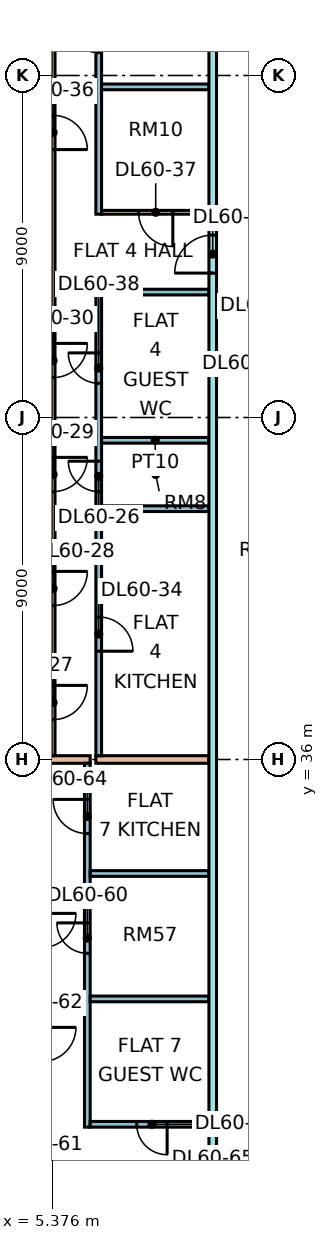
"""IFC4 building model, lengths in metres.
Left out: names, types, materials, properties, quantities, classifications, styles, units other than length and angle.
Written with IfcOpenShell. Run it as: python <this file> out.ifc"""

import sys

from ifc_helpers import new_model, si_unit, direction, frame, frame_2d, origin, place, context, subcontext, project, spatial, rectangle, extrude, element, fill, save


model = new_model("IFC4")
c1 = context("Model", 3, precision=1e-05, world=origin(), true_north=direction((0.0, 1.0)))
c2 = subcontext(c1, "Body", "Model", "MODEL_VIEW")
j1 = project(units=[si_unit("LENGTHUNIT", "METRE"), si_unit("PLANEANGLEUNIT", "RADIAN")], contexts=[c1])
p1 = place(None, origin())
s1 = spatial("IfcSite", under=j1, at=p1, CompositionType="ELEMENT")
p2 = place(p1, origin())
s2 = spatial("IfcBuilding", under=s1, at=p2, CompositionType="ELEMENT")
p3 = place(p2, frame((0.0, 0.0, 252.9)))
s3 = spatial("IfcBuildingStorey", under=s2, at=p3, CompositionType="ELEMENT", Elevation=252.9)
p4 = place(p3, frame((0.0, 36.0, 0.0), z_axis=(0.0, 0.0, 1.0), x_axis=(1.0, 0.0, 0.0)))
e1 = element("IfcWall", 1, at=p4, inside=s3, PredefinedType="PARTITIONING", context=c2, shape_type="SweptSolid", body=[
    extrude(rectangle(XDim=6.375, YDim=0.2, at=frame_2d((3.188, 0.0))), origin(), (0.0, 0.0, 1.0), 3.3),
])
p5 = place(p3, frame((5.4, 36.1, 0.0), z_axis=(0.0, 0.0, 1.0), x_axis=(0.0, 1.0, 0.0)))
e2 = element("IfcWall", 2, at=p5, inside=s3, PredefinedType="PARTITIONING", context=c2, shape_type="SweptSolid", body=[
    extrude(rectangle(XDim=26.95, YDim=0.1, at=frame_2d((13.475, 0.0))), origin(), (0.0, 0.0, 1.0), 3.3),
])
p6 = place(p5, frame((0.95, 0.0, 0.0)))
e3 = element("IfcOpeningElement", 3, at=p6, cuts=e2, PredefinedType="OPENING", context=c2, shape_type="SweptSolid", body=[
    extrude(rectangle(XDim=0.9, YDim=2.1, at=frame_2d((0.45, 1.05))), frame((0.0, 0.06, 0.0), z_axis=(0.0, -1.0, 0.0), x_axis=(1.0, 0.0, 0.0)), (0.0, 0.0, 1.0), 0.12),
])
p7 = place(p5, frame((3.95, 0.0, 0.0)))
e4 = element("IfcOpeningElement", 4, at=p7, cuts=e2, PredefinedType="OPENING", context=c2, shape_type="SweptSolid", body=[
    extrude(rectangle(XDim=0.9, YDim=2.1, at=frame_2d((0.45, 1.05))), frame((0.0, 0.06, 0.0), z_axis=(0.0, -1.0, 0.0), x_axis=(1.0, 0.0, 0.0)), (0.0, 0.0, 1.0), 0.12),
])
p8 = place(p5, frame((6.95, 0.0, 0.0)))
e5 = element("IfcOpeningElement", 5, at=p8, cuts=e2, PredefinedType="OPENING", context=c2, shape_type="SweptSolid", body=[
    extrude(rectangle(XDim=0.9, YDim=2.1, at=frame_2d((0.45, 1.05))), frame((0.0, 0.06, 0.0), z_axis=(0.0, -1.0, 0.0), x_axis=(1.0, 0.0, 0.0)), (0.0, 0.0, 1.0), 0.12),
])
p9 = place(p5, frame((9.95, 0.0, 0.0)))
e6 = element("IfcOpeningElement", 6, at=p9, cuts=e2, PredefinedType="OPENING", context=c2, shape_type="SweptSolid", body=[
    extrude(rectangle(XDim=0.9, YDim=2.1, at=frame_2d((0.45, 1.05))), frame((0.0, 0.06, 0.0), z_axis=(0.0, -1.0, 0.0), x_axis=(1.0, 0.0, 0.0)), (0.0, 0.0, 1.0), 0.12),
])
p10 = place(p5, frame((21.95, 0.0, 0.0)))
e7 = element("IfcOpeningElement", 7, at=p10, cuts=e2, PredefinedType="OPENING", context=c2, shape_type="SweptSolid", body=[
    extrude(rectangle(XDim=0.9, YDim=2.1, at=frame_2d((0.45, 1.05))), frame((0.0, 0.06, 0.0), z_axis=(0.0, -1.0, 0.0), x_axis=(1.0, 0.0, 0.0)), (0.0, 0.0, 1.0), 0.12),
])
p11 = place(p5, frame((24.95, 0.0, 0.0)))
e8 = element("IfcOpeningElement", 8, at=p11, cuts=e2, PredefinedType="OPENING", context=c2, shape_type="SweptSolid", body=[
    extrude(rectangle(XDim=0.9, YDim=2.1, at=frame_2d((0.45, 1.05))), frame((0.0, 0.06, 0.0), z_axis=(0.0, -1.0, 0.0), x_axis=(1.0, 0.0, 0.0)), (0.0, 0.0, 1.0), 0.12),
])
p12 = place(p5, frame((15.95, 0.0, 0.0)))
e9 = element("IfcOpeningElement", 9, at=p12, cuts=e2, PredefinedType="OPENING", context=c2, shape_type="SweptSolid", body=[
    extrude(rectangle(XDim=0.9, YDim=2.1, at=frame_2d((0.45, 1.05))), frame((0.0, 0.06, 0.0), z_axis=(0.0, -1.0, 0.0), x_axis=(1.0, 0.0, 0.0)), (0.0, 0.0, 1.0), 0.12),
])
p13 = place(p3, frame((6.3, 26.325, 0.0), z_axis=(0.0, 0.0, 1.0), x_axis=(0.0, 1.0, 0.0)))
e10 = element("IfcWall", 10, at=p13, inside=s3, PredefinedType="PARTITIONING", context=c2, shape_type="SweptSolid", body=[
    extrude(rectangle(XDim=9.575, YDim=0.15, at=frame_2d((4.788, 0.0))), origin(), (0.0, 0.0, 1.0), 3.3),
])
p14 = place(p13, frame((4.575, 0.0, 0.0)))
e11 = element("IfcOpeningElement", 11, at=p14, cuts=e10, PredefinedType="OPENING", context=c2, shape_type="SweptSolid", body=[
    extrude(rectangle(XDim=0.8, YDim=2.1, at=frame_2d((0.4, 1.05))), frame((0.0, 0.085, 0.0), z_axis=(0.0, -1.0, 0.0), x_axis=(1.0, 0.0, 0.0)), (0.0, 0.0, 1.0), 0.17),
])
p15 = place(p13, frame((7.725, 0.0, 0.0)))
e12 = element("IfcOpeningElement", 12, at=p15, cuts=e10, PredefinedType="OPENING", context=c2, shape_type="SweptSolid", body=[
    extrude(rectangle(XDim=0.9, YDim=2.1, at=frame_2d((0.45, 1.05))), frame((0.0, 0.085, 0.0), z_axis=(0.0, -1.0, 0.0), x_axis=(1.0, 0.0, 0.0)), (0.0, 0.0, 1.0), 0.17),
])
p16 = place(p3, frame((6.375, 26.4, 0.0), z_axis=(0.0, 0.0, 1.0), x_axis=(1.0, 0.0, 0.0)))
e13 = element("IfcWall", 13, at=p16, inside=s3, PredefinedType="PARTITIONING", context=c2, shape_type="SweptSolid", body=[
    extrude(rectangle(XDim=3.125, YDim=0.15, at=frame_2d((1.562, 0.0))), origin(), (0.0, 0.0, 1.0), 3.3),
])
p17 = place(p16, frame((1.225, 0.0, 0.0)))
e14 = element("IfcOpeningElement", 14, at=p17, cuts=e13, PredefinedType="OPENING", context=c2, shape_type="SweptSolid", body=[
    extrude(rectangle(XDim=0.8, YDim=2.1, at=frame_2d((0.4, 1.05))), frame((0.0, 0.085, 0.0), z_axis=(0.0, -1.0, 0.0), x_axis=(1.0, 0.0, 0.0)), (0.0, 0.0, 1.0), 0.17),
])
for number, where, z_axis, x_axis in (
    (15, (6.375, 29.7, 0.0), (0.0, 0.0, 1.0), (1.0, 0.0, 0.0)),
    (16, (6.375, 33.0, 0.0), (0.0, 0.0, 1.0), (1.0, 0.0, 0.0)),
):
    element("IfcWall", number, at=place(p3, frame(where, z_axis=z_axis, x_axis=x_axis)), inside=s3, PredefinedType="PARTITIONING", context=c2, shape_type="SweptSolid", body=[
        extrude(rectangle(XDim=3.125, YDim=0.15, at=frame_2d((1.562, 0.0))), origin(), (0.0, 0.0, 1.0), 3.3),
    ])
p18 = place(p3, frame((6.525, 36.0, 0.0), z_axis=(0.0, 0.0, 1.0), x_axis=(1.0, 0.0, 0.0)))
e17 = element("IfcWall", 17, at=p18, inside=s3, PredefinedType="PARTITIONING", context=c2, shape_type="SweptSolid", body=[
    extrude(rectangle(XDim=2.975, YDim=0.2, at=frame_2d((1.488, 0.0))), origin(), (0.0, 0.0, 1.0), 3.3),
])
p19 = place(p3, frame((6.6, 36.1, 0.0), z_axis=(0.0, 0.0, 1.0), x_axis=(0.0, 1.0, 0.0)))
e18 = element("IfcWall", 18, at=p19, inside=s3, PredefinedType="PARTITIONING", context=c2, shape_type="SweptSolid", body=[
    extrude(rectangle(XDim=12.275, YDim=0.15, at=frame_2d((6.137, 0.0))), origin(), (0.0, 0.0, 1.0), 3.3),
])
p20 = place(p19, frame((6.95, 0.0, 0.0)))
e19 = element("IfcOpeningElement", 19, at=p20, cuts=e18, PredefinedType="OPENING", context=c2, shape_type="SweptSolid", body=[
    extrude(rectangle(XDim=0.8, YDim=2.1, at=frame_2d((0.4, 1.05))), frame((0.0, 0.085, 0.0), z_axis=(0.0, -1.0, 0.0), x_axis=(1.0, 0.0, 0.0)), (0.0, 0.0, 1.0), 0.17),
])
p21 = place(p19, frame((2.75, 0.0, 0.0)))
e20 = element("IfcOpeningElement", 20, at=p21, cuts=e18, PredefinedType="OPENING", context=c2, shape_type="SweptSolid", body=[
    extrude(rectangle(XDim=0.9, YDim=2.1, at=frame_2d((0.45, 1.05))), frame((0.0, 0.085, 0.0), z_axis=(0.0, -1.0, 0.0), x_axis=(1.0, 0.0, 0.0)), (0.0, 0.0, 1.0), 0.17),
])
p22 = place(p19, frame((9.8, 0.0, 0.0)))
e21 = element("IfcOpeningElement", 21, at=p22, cuts=e18, PredefinedType="OPENING", context=c2, shape_type="SweptSolid", body=[
    extrude(rectangle(XDim=0.8, YDim=2.1, at=frame_2d((0.4, 1.05))), frame((0.0, 0.085, 0.0), z_axis=(0.0, -1.0, 0.0), x_axis=(1.0, 0.0, 0.0)), (0.0, 0.0, 1.0), 0.17),
])
p23 = place(p3, frame((6.6, 50.35, 0.0), z_axis=(0.0, 0.0, 1.0), x_axis=(0.0, 1.0, 0.0)))
e22 = element("IfcWall", 22, at=p23, inside=s3, PredefinedType="PARTITIONING", context=c2, shape_type="SweptSolid", body=[
    extrude(rectangle(XDim=14.0, YDim=0.15, at=frame_2d((7.0, 0.0))), origin(), (0.0, 0.0, 1.0), 3.3),
])
p24 = place(p23, frame((11.0, 0.0, 0.0)))
e23 = element("IfcOpeningElement", 23, at=p24, cuts=e22, PredefinedType="OPENING", context=c2, shape_type="SweptSolid", body=[
    extrude(rectangle(XDim=0.8, YDim=2.1, at=frame_2d((0.4, 1.05))), frame((0.0, 0.085, 0.0), z_axis=(0.0, -1.0, 0.0), x_axis=(1.0, 0.0, 0.0)), (0.0, 0.0, 1.0), 0.17),
])
p25 = place(p23, frame((4.25, 0.0, 0.0)))
e24 = element("IfcOpeningElement", 24, at=p25, cuts=e22, PredefinedType="OPENING", context=c2, shape_type="SweptSolid", body=[
    extrude(rectangle(XDim=0.8, YDim=2.1, at=frame_2d((0.4, 1.05))), frame((0.0, 0.085, 0.0), z_axis=(0.0, -1.0, 0.0), x_axis=(1.0, 0.0, 0.0)), (0.0, 0.0, 1.0), 0.17),
])
p26 = place(p23, frame((7.7, 0.0, 0.0)))
e25 = element("IfcOpeningElement", 25, at=p26, cuts=e22, PredefinedType="OPENING", context=c2, shape_type="SweptSolid", body=[
    extrude(rectangle(XDim=0.8, YDim=2.1, at=frame_2d((0.4, 1.05))), frame((0.0, 0.085, 0.0), z_axis=(0.0, -1.0, 0.0), x_axis=(1.0, 0.0, 0.0)), (0.0, 0.0, 1.0), 0.17),
])
for number, where, z_axis, x_axis in (
    (26, (6.675, 42.6, 0.0), (0.0, 0.0, 1.0), (1.0, 0.0, 0.0)),
    (27, (6.675, 44.4, 0.0), (0.0, 0.0, 1.0), (1.0, 0.0, 0.0)),
    (28, (6.675, 48.3, 0.0), (0.0, 0.0, 1.0), (1.0, 0.0, 0.0)),
):
    element("IfcWall", number, at=place(p3, frame(where, z_axis=z_axis, x_axis=x_axis)), inside=s3, PredefinedType="PARTITIONING", context=c2, shape_type="SweptSolid", body=[
        extrude(rectangle(XDim=2.825, YDim=0.15, at=frame_2d((1.413, 0.0))), origin(), (0.0, 0.0, 1.0), 3.3),
    ])
p27 = place(p3, frame((6.675, 50.4, 0.0), z_axis=(0.0, 0.0, 1.0), x_axis=(1.0, 0.0, 0.0)))
e29 = element("IfcWall", 29, at=p27, inside=s3, PredefinedType="PARTITIONING", context=c2, shape_type="SweptSolid", body=[
    extrude(rectangle(XDim=2.825, YDim=0.1, at=frame_2d((1.413, 0.0))), origin(), (0.0, 0.0, 1.0), 3.3),
])
p28 = place(p27, frame((0.975, 0.0, 0.0)))
e30 = element("IfcOpeningElement", 30, at=p28, cuts=e29, PredefinedType="OPENING", context=c2, shape_type="SweptSolid", body=[
    extrude(rectangle(XDim=0.9, YDim=2.1, at=frame_2d((0.45, 1.05))), frame((0.0, 0.06, 0.0), z_axis=(0.0, -1.0, 0.0), x_axis=(1.0, 0.0, 0.0)), (0.0, 0.0, 1.0), 0.12),
])
p29 = place(p3, frame((6.675, 53.7, 0.0), z_axis=(0.0, 0.0, 1.0), x_axis=(1.0, 0.0, 0.0)))
e31 = element("IfcWall", 31, at=p29, inside=s3, PredefinedType="PARTITIONING", context=c2, shape_type="SweptSolid", body=[
    extrude(rectangle(XDim=2.825, YDim=0.15, at=frame_2d((1.413, 0.0))), origin(), (0.0, 0.0, 1.0), 3.3),
])
p30 = place(p3, frame((9.6, 20.0, 0.0), z_axis=(0.0, 0.0, 1.0), x_axis=(0.0, 1.0, 0.0)))
e32 = element("IfcWall", 32, at=p30, inside=s3, PredefinedType="PARTITIONING", context=c2, shape_type="SweptSolid", body=[
    extrude(rectangle(XDim=44.35, YDim=0.2, at=frame_2d((22.175, 0.0))), origin(), (0.0, 0.0, 1.0), 3.3),
])
p31 = place(p30, frame((28.8, 0.0, 0.0)))
e33 = element("IfcOpeningElement", 33, at=p31, cuts=e32, PredefinedType="OPENING", context=c2, shape_type="SweptSolid", body=[
    extrude(rectangle(XDim=1.0, YDim=2.1, at=frame_2d((0.5, 1.05))), frame((0.0, 0.11, 0.0), z_axis=(0.0, -1.0, 0.0), x_axis=(1.0, 0.0, 0.0)), (0.0, 0.0, 1.0), 0.22),
])
p32 = place(p30, frame((0.6, 0.0, 0.0)))
e34 = element("IfcOpeningElement", 34, at=p32, cuts=e32, PredefinedType="OPENING", context=c2, shape_type="SweptSolid", body=[
    extrude(rectangle(XDim=1.2, YDim=2.1, at=frame_2d((0.6, 1.05))), frame((0.0, 0.11, 0.0), z_axis=(0.0, -1.0, 0.0), x_axis=(1.0, 0.0, 0.0)), (0.0, 0.0, 1.0), 0.22),
])
p33 = place(p30, frame((3.9, 0.0, 0.0)))
e35 = element("IfcOpeningElement", 35, at=p33, cuts=e32, PredefinedType="OPENING", context=c2, shape_type="SweptSolid", body=[
    extrude(rectangle(XDim=1.0, YDim=2.1, at=frame_2d((0.5, 1.05))), frame((0.0, 0.11, 0.0), z_axis=(0.0, -1.0, 0.0), x_axis=(1.0, 0.0, 0.0)), (0.0, 0.0, 1.0), 0.22),
])
p34 = place(p20, frame((0.8, 0.0, 0.0), z_axis=(0.0, 0.0, 1.0), x_axis=(-1.0, 0.0, 0.0)))
e36 = element("IfcDoor", 36, at=p34, inside=s3, OperationType="SINGLE_SWING_RIGHT", PredefinedType="DOOR", context=c2, shape_type="SweptSolid", body=[
    extrude(rectangle(XDim=0.8, YDim=2.1, at=frame_2d((0.4, 1.05))), frame((0.0, 0.025, 0.0), z_axis=(0.0, -1.0, 0.0), x_axis=(1.0, 0.0, 0.0)), (0.0, 0.0, 1.0), 0.05),
])
fill(e19, e36)
p35 = place(p6, origin())
e37 = element("IfcDoor", 37, at=p35, inside=s3, OperationType="SINGLE_SWING_RIGHT", PredefinedType="DOOR", context=c2, shape_type="SweptSolid", body=[
    extrude(rectangle(XDim=0.9, YDim=2.1, at=frame_2d((0.45, 1.05))), frame((0.0, 0.025, 0.0), z_axis=(0.0, -1.0, 0.0), x_axis=(1.0, 0.0, 0.0)), (0.0, 0.0, 1.0), 0.05),
])
fill(e3, e37)
p36 = place(p7, origin())
e38 = element("IfcDoor", 38, at=p36, inside=s3, OperationType="SINGLE_SWING_RIGHT", PredefinedType="DOOR", context=c2, shape_type="SweptSolid", body=[
    extrude(rectangle(XDim=0.9, YDim=2.1, at=frame_2d((0.45, 1.05))), frame((0.0, 0.025, 0.0), z_axis=(0.0, -1.0, 0.0), x_axis=(1.0, 0.0, 0.0)), (0.0, 0.0, 1.0), 0.05),
])
fill(e4, e38)
p37 = place(p8, origin())
e39 = element("IfcDoor", 39, at=p37, inside=s3, OperationType="SINGLE_SWING_RIGHT", PredefinedType="DOOR", context=c2, shape_type="SweptSolid", body=[
    extrude(rectangle(XDim=0.9, YDim=2.1, at=frame_2d((0.45, 1.05))), frame((0.0, 0.025, 0.0), z_axis=(0.0, -1.0, 0.0), x_axis=(1.0, 0.0, 0.0)), (0.0, 0.0, 1.0), 0.05),
])
fill(e5, e39)
p38 = place(p9, origin())
e40 = element("IfcDoor", 40, at=p38, inside=s3, OperationType="SINGLE_SWING_RIGHT", PredefinedType="DOOR", context=c2, shape_type="SweptSolid", body=[
    extrude(rectangle(XDim=0.9, YDim=2.1, at=frame_2d((0.45, 1.05))), frame((0.0, 0.025, 0.0), z_axis=(0.0, -1.0, 0.0), x_axis=(1.0, 0.0, 0.0)), (0.0, 0.0, 1.0), 0.05),
])
fill(e6, e40)
p39 = place(p31, origin())
e41 = element("IfcDoor", 41, at=p39, inside=s3, OperationType="SINGLE_SWING_LEFT", PredefinedType="DOOR", context=c2, shape_type="SweptSolid", body=[
    extrude(rectangle(XDim=1.0, YDim=2.1, at=frame_2d((0.5, 1.05))), frame((0.0, 0.025, 0.0), z_axis=(0.0, -1.0, 0.0), x_axis=(1.0, 0.0, 0.0)), (0.0, 0.0, 1.0), 0.05),
])
fill(e33, e41)
p40 = place(p21, frame((0.9, 0.0, 0.0), z_axis=(0.0, 0.0, 1.0), x_axis=(-1.0, 0.0, 0.0)))
e42 = element("IfcDoor", 42, at=p40, inside=s3, OperationType="SINGLE_SWING_LEFT", PredefinedType="DOOR", context=c2, shape_type="SweptSolid", body=[
    extrude(rectangle(XDim=0.9, YDim=2.1, at=frame_2d((0.45, 1.05))), frame((0.0, 0.025, 0.0), z_axis=(0.0, -1.0, 0.0), x_axis=(1.0, 0.0, 0.0)), (0.0, 0.0, 1.0), 0.05),
])
fill(e20, e42)
p41 = place(p12, frame((0.9, 0.0, 0.0), z_axis=(0.0, 0.0, 1.0), x_axis=(-1.0, 0.0, 0.0)))
e43 = element("IfcDoor", 43, at=p41, inside=s3, OperationType="SINGLE_SWING_LEFT", PredefinedType="DOOR", context=c2, shape_type="SweptSolid", body=[
    extrude(rectangle(XDim=0.9, YDim=2.1, at=frame_2d((0.45, 1.05))), frame((0.0, 0.025, 0.0), z_axis=(0.0, -1.0, 0.0), x_axis=(1.0, 0.0, 0.0)), (0.0, 0.0, 1.0), 0.05),
])
fill(e9, e43)
p42 = place(p28, origin())
e44 = element("IfcDoor", 44, at=p42, inside=s3, OperationType="SINGLE_SWING_RIGHT", PredefinedType="DOOR", context=c2, shape_type="SweptSolid", body=[
    extrude(rectangle(XDim=0.9, YDim=2.1, at=frame_2d((0.45, 1.05))), frame((0.0, 0.025, 0.0), z_axis=(0.0, -1.0, 0.0), x_axis=(1.0, 0.0, 0.0)), (0.0, 0.0, 1.0), 0.05),
])
fill(e30, e44)
p43 = place(p22, frame((0.8, 0.0, 0.0), z_axis=(0.0, 0.0, 1.0), x_axis=(-1.0, 0.0, 0.0)))
e45 = element("IfcDoor", 45, at=p43, inside=s3, OperationType="SINGLE_SWING_RIGHT", PredefinedType="DOOR", context=c2, shape_type="SweptSolid", body=[
    extrude(rectangle(XDim=0.8, YDim=2.1, at=frame_2d((0.4, 1.05))), frame((0.0, 0.025, 0.0), z_axis=(0.0, -1.0, 0.0), x_axis=(1.0, 0.0, 0.0)), (0.0, 0.0, 1.0), 0.05),
])
fill(e21, e45)
p44 = place(p25, frame((0.8, 0.0, 0.0), z_axis=(0.0, 0.0, 1.0), x_axis=(-1.0, 0.0, 0.0)))
e46 = element("IfcDoor", 46, at=p44, inside=s3, OperationType="SINGLE_SWING_RIGHT", PredefinedType="DOOR", context=c2, shape_type="SweptSolid", body=[
    extrude(rectangle(XDim=0.8, YDim=2.1, at=frame_2d((0.4, 1.05))), frame((0.0, 0.025, 0.0), z_axis=(0.0, -1.0, 0.0), x_axis=(1.0, 0.0, 0.0)), (0.0, 0.0, 1.0), 0.05),
])
fill(e24, e46)
p45 = place(p14, frame((0.8, 0.0, 0.0), z_axis=(0.0, 0.0, 1.0), x_axis=(-1.0, 0.0, 0.0)))
e47 = element("IfcDoor", 47, at=p45, inside=s3, OperationType="SINGLE_SWING_RIGHT", PredefinedType="DOOR", context=c2, shape_type="SweptSolid", body=[
    extrude(rectangle(XDim=0.8, YDim=2.1, at=frame_2d((0.4, 1.05))), frame((0.0, 0.025, 0.0), z_axis=(0.0, -1.0, 0.0), x_axis=(1.0, 0.0, 0.0)), (0.0, 0.0, 1.0), 0.05),
])
fill(e11, e47)
p46 = place(p15, frame((0.9, 0.0, 0.0), z_axis=(0.0, 0.0, 1.0), x_axis=(-1.0, 0.0, 0.0)))
e48 = element("IfcDoor", 48, at=p46, inside=s3, OperationType="SINGLE_SWING_RIGHT", PredefinedType="DOOR", context=c2, shape_type="SweptSolid", body=[
    extrude(rectangle(XDim=0.9, YDim=2.1, at=frame_2d((0.45, 1.05))), frame((0.0, 0.025, 0.0), z_axis=(0.0, -1.0, 0.0), x_axis=(1.0, 0.0, 0.0)), (0.0, 0.0, 1.0), 0.05),
])
fill(e12, e48)
p47 = place(p17, origin())
e49 = element("IfcDoor", 49, at=p47, inside=s3, OperationType="SINGLE_SWING_RIGHT", PredefinedType="DOOR", context=c2, shape_type="SweptSolid", body=[
    extrude(rectangle(XDim=0.8, YDim=2.1, at=frame_2d((0.4, 1.05))), frame((0.0, 0.025, 0.0), z_axis=(0.0, -1.0, 0.0), x_axis=(1.0, 0.0, 0.0)), (0.0, 0.0, 1.0), 0.05),
])
fill(e14, e49)
save(model, sys.argv[1])
